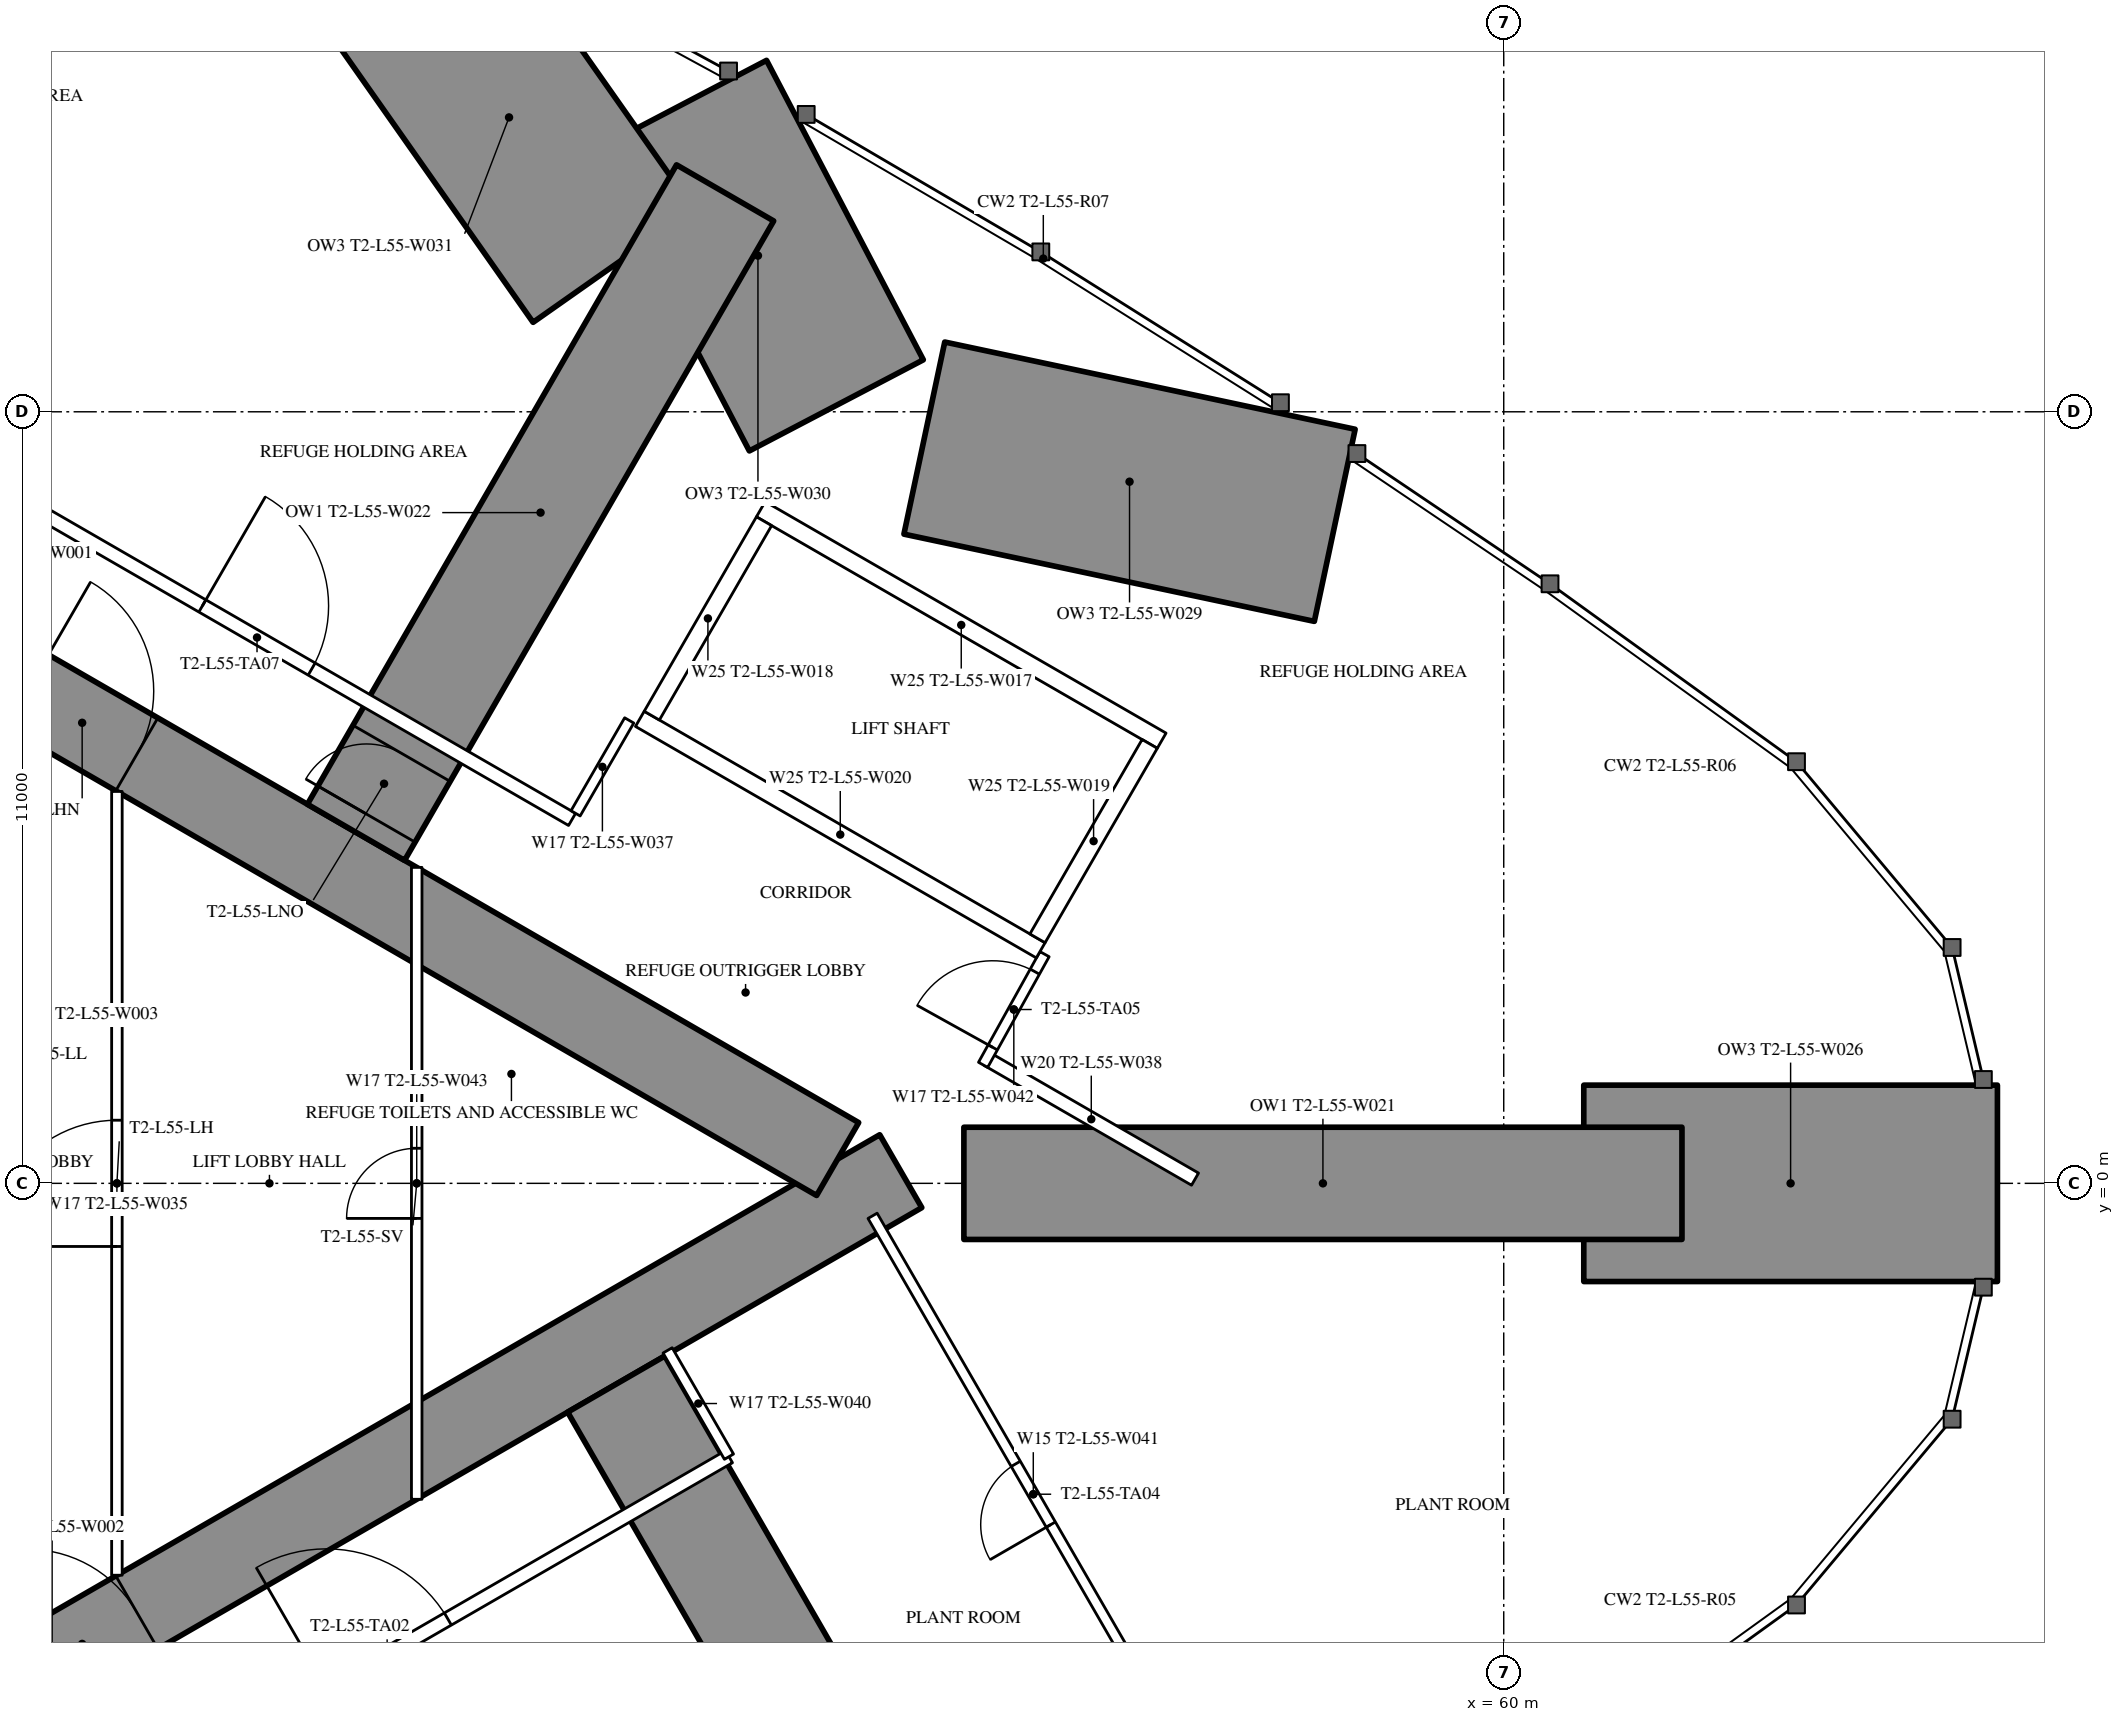
"""IFC4 building model, lengths in metres.
Left out: names, types, materials, properties, quantities, classifications, styles, units other than length and angle.
Written with IfcOpenShell. Run it as: python <this file> out.ifc"""

import sys

from ifc_helpers import new_model, si_unit, direction, frame, frame_2d, origin, place, context, subcontext, project, spatial, rectangle, extrude, element, fill, save


model = new_model("IFC4")
c1 = context("Model", 3, precision=1e-05, world=origin(), true_north=direction((0.0, 1.0)))
c2 = subcontext(c1, "Body", "Model", "MODEL_VIEW")
j1 = project(units=[si_unit("LENGTHUNIT", "METRE"), si_unit("PLANEANGLEUNIT", "RADIAN")], contexts=[c1])
p1 = place(None, origin())
s1 = spatial("IfcSite", under=j1, at=p1, CompositionType="ELEMENT")
p2 = place(p1, origin())
s2 = spatial("IfcBuilding", under=s1, at=p2, CompositionType="ELEMENT")
p3 = place(p2, frame((0.0, 0.0, 205.3)))
s3 = spatial("IfcBuildingStorey", under=s2, at=p3, CompositionType="ELEMENT", Elevation=205.3)
p4 = place(p3, frame((67.04, 0.0, 0.0), z_axis=(0.0, 0.0, 1.0), x_axis=(-1.0, 0.0, 0.0)))
e1 = element("IfcWall", 1, at=p4, inside=s3, PredefinedType="SHEAR", context=c2, shape_type="SweptSolid", body=[
    extrude(rectangle(XDim=5.898, YDim=2.8, at=frame_2d((2.949, 0.0))), origin(), (0.0, 0.0, 1.0), 5.0),
])
p5 = place(p3, frame((57.59, 9.381, 0.0), z_axis=(0.0, 0.0, 1.0), x_axis=(-0.978147441256, 0.207912441101, 0.0)))
e2 = element("IfcWall", 2, at=p5, inside=s3, PredefinedType="SHEAR", context=c2, shape_type="SweptSolid", body=[
    extrude(rectangle(XDim=5.983, YDim=2.8, at=frame_2d((2.991, 0.0))), origin(), (0.0, 0.0, 1.0), 5.0),
])
p6 = place(p3, frame((48.248, 15.361, 0.0), z_axis=(0.0, 0.0, 1.0), x_axis=(0.463812018538, -0.885933638293, 0.0)))
e3 = element("IfcWall", 3, at=p6, inside=s3, PredefinedType="SHEAR", context=c2, shape_type="SweptSolid", body=[
    extrude(rectangle(XDim=4.82, YDim=2.8, at=frame_2d((2.41, 0.0))), origin(), (0.0, 0.0, 1.0), 5.0),
])
p7 = place(p3, frame((44.328, 17.314, 0.0), z_axis=(0.0, 0.0, 1.0), x_axis=(0.575107689221, -0.818077713789, 0.0)))
e4 = element("IfcWall", 4, at=p7, inside=s3, PredefinedType="SHEAR", context=c2, shape_type="SweptSolid", body=[
    extrude(rectangle(XDim=5.175, YDim=2.8, at=frame_2d((2.587, 0.0))), origin(), (0.0, 0.0, 1.0), 5.0),
])
p8 = place(p3, frame((27.2, -13.8, 0.0), z_axis=(0.0, 0.0, 1.0), x_axis=(0.866027159892, 0.499996958321, 0.0)))
e5 = element("IfcWall", 5, at=p8, inside=s3, PredefinedType="SHEAR", context=c2, shape_type="SweptSolid", body=[
    extrude(rectangle(XDim=27.947, YDim=1.2, at=frame_2d((13.973, 0.0))), origin(), (0.0, 0.0, 1.0), 5.0),
])
p9 = place(p8, frame((6.5, 0.0, 0.0)))
e6 = element("IfcOpeningElement", 6, at=p9, cuts=e5, PredefinedType="OPENING", context=c2, shape_type="SweptSolid", body=[
    extrude(rectangle(XDim=1.0, YDim=2.2, at=frame_2d((0.5, 1.1))), frame((0.0, 0.61, 0.0), z_axis=(0.0, -1.0, 0.0), x_axis=(1.0, 0.0, 0.0)), (0.0, 0.0, 1.0), 1.22),
])
p10 = place(p8, frame((13.568, 0.0, 0.0)))
e7 = element("IfcOpeningElement", 7, at=p10, cuts=e5, PredefinedType="OPENING", context=c2, shape_type="SweptSolid", body=[
    extrude(rectangle(XDim=1.8, YDim=2.2, at=frame_2d((0.9, 1.1))), frame((0.0, 0.61, 0.0), z_axis=(0.0, -1.0, 0.0), x_axis=(1.0, 0.0, 0.0)), (0.0, 0.0, 1.0), 1.22),
])
p11 = place(p3, frame((27.2, 13.8, 0.0), z_axis=(0.0, 0.0, 1.0), x_axis=(0.866024515034, -0.500001539357, 0.0)))
e8 = element("IfcWall", 8, at=p11, inside=s3, PredefinedType="SHEAR", context=c2, shape_type="SweptSolid", body=[
    extrude(rectangle(XDim=26.907, YDim=1.2, at=frame_2d((13.454, 0.0))), origin(), (0.0, 0.0, 1.0), 5.0),
])
p12 = place(p11, frame((6.5, 0.0, 0.0)))
e9 = element("IfcOpeningElement", 9, at=p12, cuts=e8, PredefinedType="OPENING", context=c2, shape_type="SweptSolid", body=[
    extrude(rectangle(XDim=1.0, YDim=2.2, at=frame_2d((0.5, 1.1))), frame((0.0, 0.61, 0.0), z_axis=(0.0, -1.0, 0.0), x_axis=(1.0, 0.0, 0.0)), (0.0, 0.0, 1.0), 1.22),
])
p13 = place(p11, frame((13.568, 0.0, 0.0)))
e10 = element("IfcOpeningElement", 10, at=p13, cuts=e8, PredefinedType="OPENING", context=c2, shape_type="SweptSolid", body=[
    extrude(rectangle(XDim=1.8, YDim=2.2, at=frame_2d((0.9, 1.1))), frame((0.0, 0.61, 0.0), z_axis=(0.0, -1.0, 0.0), x_axis=(1.0, 0.0, 0.0)), (0.0, 0.0, 1.0), 1.22),
])
p14 = place(p3, frame((47.345, -2.862, 0.0), z_axis=(0.0, 0.0, 1.0), x_axis=(0.500012973899, -0.866017913171, 0.0)))
e11 = element("IfcWall", 11, at=p14, inside=s3, PredefinedType="SHEAR", context=c2, shape_type="SweptSolid", body=[
    extrude(rectangle(XDim=10.499, YDim=1.6, at=frame_2d((5.25, 0.0))), origin(), (0.0, 0.0, 1.0), 5.0),
])
p15 = place(p14, frame((5.087, 0.0, 0.0)))
e12 = element("IfcOpeningElement", 12, at=p15, cuts=e11, PredefinedType="OPENING", context=c2, shape_type="SweptSolid", body=[
    extrude(rectangle(XDim=1.0, YDim=2.2, at=frame_2d((0.5, 1.1))), frame((0.0, 0.81, 0.0), z_axis=(0.0, -1.0, 0.0), x_axis=(1.0, 0.0, 0.0)), (0.0, 0.0, 1.0), 1.62),
])
p16 = place(p3, frame((52.302, 0.0, 0.0), z_axis=(0.0, 0.0, 1.0), x_axis=(1.0, 0.0, 0.0)))
e13 = element("IfcWall", 13, at=p16, inside=s3, PredefinedType="SHEAR", context=c2, shape_type="SweptSolid", body=[
    extrude(rectangle(XDim=10.239, YDim=1.6, at=frame_2d((5.12, 0.0))), origin(), (0.0, 0.0, 1.0), 5.0),
])
p17 = place(p3, frame((43.634, 5.004, 0.0), z_axis=(0.0, 0.0, 1.0), x_axis=(0.499995493849, 0.866028005396, 0.0)))
e14 = element("IfcWall", 14, at=p17, inside=s3, PredefinedType="SHEAR", context=c2, shape_type="SweptSolid", body=[
    extrude(rectangle(XDim=10.526, YDim=1.6, at=frame_2d((5.263, 0.0))), origin(), (0.0, 0.0, 1.0), 5.0),
])
p18 = place(p17, frame((0.3, 0.0, 0.0)))
e15 = element("IfcOpeningElement", 15, at=p18, cuts=e14, PredefinedType="OPENING", context=c2, shape_type="SweptSolid", body=[
    extrude(rectangle(XDim=1.0, YDim=2.2, at=frame_2d((0.5, 1.1))), frame((0.0, 0.81, 0.0), z_axis=(0.0, -1.0, 0.0), x_axis=(1.0, 0.0, 0.0)), (0.0, 0.0, 1.0), 1.62),
])
p19 = place(p3, frame((55.583, -8.401, 0.0), z_axis=(0.0, 0.0, 1.0), x_axis=(-0.499997575924, 0.866026803321, 0.0)))
e16 = element("IfcWall", 16, at=p19, inside=s3, PredefinedType="PARTITIONING", context=c2, shape_type="SweptSolid", body=[
    extrude(rectangle(XDim=9.167, YDim=0.15, at=frame_2d((4.583, 0.0))), origin(), (0.0, 0.0, 1.0), 4.75),
])
p20 = place(p19, frame((4.083, 0.0, 0.0)))
e17 = element("IfcOpeningElement", 17, at=p20, cuts=e16, PredefinedType="OPENING", context=c2, shape_type="SweptSolid", body=[
    extrude(rectangle(XDim=1.0, YDim=2.2, at=frame_2d((0.5, 1.1))), frame((0.0, 0.085, 0.0), z_axis=(0.0, -1.0, 0.0), x_axis=(1.0, 0.0, 0.0)), (0.0, 0.0, 1.0), 0.17),
])
p21 = place(p3, frame((27.959, 16.017, 0.0), z_axis=(0.0, 0.0, 1.0), x_axis=(0.866027146794, -0.499996981007, 0.0)))
e18 = element("IfcWall", 18, at=p21, inside=s3, PredefinedType="PARTITIONING", context=c2, shape_type="SweptSolid", body=[
    extrude(rectangle(XDim=21.657, YDim=0.2, at=frame_2d((10.829, 0.0))), origin(), (0.0, 0.0, 1.0), 4.75),
])
p22 = place(p21, frame((15.57, 0.0, 0.0)))
e19 = element("IfcOpeningElement", 19, at=p22, cuts=e18, PredefinedType="OPENING", context=c2, shape_type="SweptSolid", body=[
    extrude(rectangle(XDim=1.8, YDim=2.2, at=frame_2d((0.9, 1.1))), frame((0.0, 0.11, 0.0), z_axis=(0.0, -1.0, 0.0), x_axis=(1.0, 0.0, 0.0)), (0.0, 0.0, 1.0), 0.22),
])
p23 = place(p21, frame((6.579, 0.0, 0.0)))
e20 = element("IfcOpeningElement", 20, at=p23, cuts=e18, PredefinedType="OPENING", context=c2, shape_type="SweptSolid", body=[
    extrude(rectangle(XDim=1.8, YDim=2.2, at=frame_2d((0.9, 1.1))), frame((0.0, 0.11, 0.0), z_axis=(0.0, -1.0, 0.0), x_axis=(1.0, 0.0, 0.0)), (0.0, 0.0, 1.0), 0.22),
])
p24 = place(p3, frame((52.639, 1.769, 0.0), z_axis=(0.0, 0.0, 1.0), x_axis=(0.866027340901, -0.4999966448, 0.0)))
e21 = element("IfcWall", 21, at=p24, inside=s3, PredefinedType="PARTITIONING", context=c2, shape_type="SweptSolid", body=[
    extrude(rectangle(XDim=3.417, YDim=0.2, at=frame_2d((1.708, 0.0))), origin(), (0.0, 0.0, 1.0), 4.75),
])
p25 = place(p3, frame((52.576, 1.689, 0.0), z_axis=(0.0, 0.0, 1.0), x_axis=(0.485482130951, 0.874246590229, 0.0)))
e22 = element("IfcWall", 22, at=p25, inside=s3, PredefinedType="PARTITIONING", context=c2, shape_type="SweptSolid", body=[
    extrude(rectangle(XDim=1.805, YDim=0.15, at=frame_2d((0.902, 0.0))), origin(), (0.0, 0.0, 1.0), 4.75),
])
p26 = place(p25, frame((0.285, 0.0, 0.0)))
e23 = element("IfcOpeningElement", 23, at=p26, cuts=e22, PredefinedType="OPENING", context=c2, shape_type="SweptSolid", body=[
    extrude(rectangle(XDim=1.235, YDim=2.2, at=frame_2d((0.618, 1.1))), frame((0.0, 0.085, 0.0), z_axis=(0.0, -1.0, 0.0), x_axis=(1.0, 0.0, 0.0)), (0.0, 0.0, 1.0), 0.17),
])
p27 = place(p3, frame((46.765, 5.275, 0.0), z_axis=(0.0, 0.0, 1.0), x_axis=(0.499915892944, 0.866073957571, 0.0)))
e24 = element("IfcWall", 24, at=p27, inside=s3, PredefinedType="PARTITIONING", context=c2, shape_type="SweptSolid", body=[
    extrude(rectangle(XDim=1.53, YDim=0.15, at=frame_2d((0.765, 0.0))), origin(), (0.0, 0.0, 1.0), 4.75),
])
p28 = place(p3, frame((27.959, -16.017, 0.0), z_axis=(0.0, 0.0, 1.0), x_axis=(0.866026253963, 0.499998527445, 0.0)))
e25 = element("IfcWall", 25, at=p28, inside=s3, PredefinedType="PARTITIONING", context=c2, shape_type="SweptSolid", body=[
    extrude(rectangle(XDim=24.241, YDim=0.2, at=frame_2d((12.12, 0.0))), origin(), (0.0, 0.0, 1.0), 4.75),
])
p29 = place(p28, frame((6.579, 0.0, 0.0)))
e26 = element("IfcOpeningElement", 26, at=p29, cuts=e25, PredefinedType="OPENING", context=c2, shape_type="SweptSolid", body=[
    extrude(rectangle(XDim=1.8, YDim=2.2, at=frame_2d((0.9, 1.1))), frame((0.0, 0.11, 0.0), z_axis=(0.0, -1.0, 0.0), x_axis=(1.0, 0.0, 0.0)), (0.0, 0.0, 1.0), 0.22),
])
p30 = place(p28, frame((17.612, 0.0, 0.0)))
e27 = element("IfcOpeningElement", 27, at=p30, cuts=e25, PredefinedType="OPENING", context=c2, shape_type="SweptSolid", body=[
    extrude(rectangle(XDim=2.0, YDim=2.4, at=frame_2d((1.0, 1.2))), frame((0.0, 0.11, 0.0), z_axis=(0.0, -1.0, 0.0), x_axis=(1.0, 0.0, 0.0)), (0.0, 0.0, 1.0), 0.22),
])
p31 = place(p3, frame((48.953, -3.897, 0.0), z_axis=(0.0, 0.0, 1.0), x_axis=(-0.499980071345, 0.866036909293, 0.0)))
e28 = element("IfcWall", 28, at=p31, inside=s3, PredefinedType="PARTITIONING", context=c2, shape_type="SweptSolid", body=[
    extrude(rectangle(XDim=1.75, YDim=0.15, at=frame_2d((0.875, 0.0))), origin(), (0.0, 0.0, 1.0), 4.75),
])
p32 = place(p3, frame((40.225, -5.587, 0.0), z_axis=(0.0, 0.0, 1.0), x_axis=(0.0, 1.0, 0.0)))
e29 = element("IfcWall", 29, at=p32, inside=s3, PredefinedType="PARTITIONING", context=c2, shape_type="SweptSolid", body=[
    extrude(rectangle(XDim=11.174, YDim=0.15, at=frame_2d((5.587, 0.0))), origin(), (0.0, 0.0, 1.0), 4.75),
])
p33 = place(p32, frame((4.687, 0.0, 0.0)))
e30 = element("IfcOpeningElement", 30, at=p33, cuts=e29, PredefinedType="OPENING", context=c2, shape_type="SweptSolid", body=[
    extrude(rectangle(XDim=1.8, YDim=2.2, at=frame_2d((0.9, 1.1))), frame((0.0, 0.085, 0.0), z_axis=(0.0, -1.0, 0.0), x_axis=(1.0, 0.0, 0.0)), (0.0, 0.0, 1.0), 0.17),
])
p34 = place(p3, frame((44.5, -4.505, 0.0), z_axis=(0.0, 0.0, 1.0), x_axis=(0.0, 1.0, 0.0)))
e31 = element("IfcWall", 31, at=p34, inside=s3, PredefinedType="PARTITIONING", context=c2, shape_type="SweptSolid", body=[
    extrude(rectangle(XDim=9.009, YDim=0.15, at=frame_2d((4.505, 0.0))), origin(), (0.0, 0.0, 1.0), 4.75),
])
p35 = place(p34, frame((4.005, 0.0, 0.0)))
e32 = element("IfcOpeningElement", 32, at=p35, cuts=e31, PredefinedType="OPENING", context=c2, shape_type="SweptSolid", body=[
    extrude(rectangle(XDim=1.0, YDim=2.2, at=frame_2d((0.5, 1.1))), frame((0.0, 0.085, 0.0), z_axis=(0.0, -1.0, 0.0), x_axis=(1.0, 0.0, 0.0)), (0.0, 0.0, 1.0), 0.17),
])
for number, where, z_axis, x_axis in (
    (33, (47.681, 6.622, 0.0), (0.0, 0.0, 1.0), (0.866, -0.5, 0.0)),
    (34, (49.406, 9.611, 0.0), (0.0, 0.0, 1.0), (0.866, -0.5, 0.0)),
):
    element("IfcWall", number, at=place(p3, frame(where, z_axis=z_axis, x_axis=x_axis)), inside=s3, PredefinedType="PARTITIONING", context=c2, shape_type="SweptSolid", body=[
        extrude(rectangle(XDim=6.6, YDim=0.25, at=frame_2d((3.3, 0.0))), origin(), (0.0, 0.0, 1.0), 4.75),
    ])
p36 = place(p3, frame((47.852, 6.668, 0.0), z_axis=(0.0, 0.0, 1.0), x_axis=(0.499929347863, 0.866066190972, 0.0)))
e35 = element("IfcWall", 35, at=p36, inside=s3, PredefinedType="PARTITIONING", context=c2, shape_type="SweptSolid", body=[
    extrude(rectangle(XDim=3.201, YDim=0.25, at=frame_2d((1.6, 0.0))), origin(), (0.0, 0.0, 1.0), 4.75),
])
p37 = place(p3, frame((53.352, 3.493, 0.0), z_axis=(0.0, 0.0, 1.0), x_axis=(0.499872130319, 0.866099216793, 0.0)))
e36 = element("IfcWall", 36, at=p37, inside=s3, PredefinedType="PARTITIONING", context=c2, shape_type="SweptSolid", body=[
    extrude(rectangle(XDim=3.2, YDim=0.25, at=frame_2d((1.6, 0.0))), origin(), (0.0, 0.0, 1.0), 4.75),
])
p38 = place(p18, origin())
e37 = element("IfcDoor", 37, at=p38, inside=s3, OperationType="SINGLE_SWING_LEFT", PredefinedType="DOOR", context=c2, shape_type="SweptSolid", body=[
    extrude(rectangle(XDim=1.0, YDim=2.2, at=frame_2d((0.5, 1.1))), frame((0.0, 0.025, 0.0), z_axis=(0.0, -1.0, 0.0), x_axis=(1.0, 0.0, 0.0)), (0.0, 0.0, 1.0), 0.05),
])
fill(e15, e37)
p39 = place(p30, origin())
e38 = element("IfcDoor", 38, at=p39, inside=s3, OperationType="DOUBLE_DOOR_SINGLE_SWING", PredefinedType="DOOR", context=c2, shape_type="SweptSolid", body=[
    extrude(rectangle(XDim=2.0, YDim=2.4, at=frame_2d((1.0, 1.2))), frame((0.0, 0.025, 0.0), z_axis=(0.0, -1.0, 0.0), x_axis=(1.0, 0.0, 0.0)), (0.0, 0.0, 1.0), 0.05),
])
fill(e27, e38)
p40 = place(p22, origin())
e39 = element("IfcDoor", 39, at=p40, inside=s3, OperationType="DOUBLE_DOOR_SINGLE_SWING", PredefinedType="DOOR", context=c2, shape_type="SweptSolid", body=[
    extrude(rectangle(XDim=1.8, YDim=2.2, at=frame_2d((0.9, 1.1))), frame((0.0, 0.025, 0.0), z_axis=(0.0, -1.0, 0.0), x_axis=(1.0, 0.0, 0.0)), (0.0, 0.0, 1.0), 0.05),
])
fill(e19, e39)
p41 = place(p26, origin())
e40 = element("IfcDoor", 40, at=p41, inside=s3, OperationType="SINGLE_SWING_LEFT", PredefinedType="DOOR", context=c2, shape_type="SweptSolid", body=[
    extrude(rectangle(XDim=1.235, YDim=2.2, at=frame_2d((0.618, 1.1))), frame((0.0, 0.025, 0.0), z_axis=(0.0, -1.0, 0.0), x_axis=(1.0, 0.0, 0.0)), (0.0, 0.0, 1.0), 0.05),
])
fill(e23, e40)
p42 = place(p20, origin())
e41 = element("IfcDoor", 41, at=p42, inside=s3, OperationType="SINGLE_SWING_LEFT", PredefinedType="DOOR", context=c2, shape_type="SweptSolid", body=[
    extrude(rectangle(XDim=1.0, YDim=2.2, at=frame_2d((0.5, 1.1))), frame((0.0, 0.025, 0.0), z_axis=(0.0, -1.0, 0.0), x_axis=(1.0, 0.0, 0.0)), (0.0, 0.0, 1.0), 0.05),
])
fill(e17, e41)
p43 = place(p33, origin())
e42 = element("IfcDoor", 42, at=p43, inside=s3, OperationType="DOUBLE_DOOR_SINGLE_SWING", PredefinedType="DOOR", context=c2, shape_type="SweptSolid", body=[
    extrude(rectangle(XDim=1.8, YDim=2.2, at=frame_2d((0.9, 1.1))), frame((0.0, 0.025, 0.0), z_axis=(0.0, -1.0, 0.0), x_axis=(1.0, 0.0, 0.0)), (0.0, 0.0, 1.0), 0.05),
])
fill(e30, e42)
p44 = place(p35, origin())
e43 = element("IfcDoor", 43, at=p44, inside=s3, OperationType="SINGLE_SWING_LEFT", PredefinedType="DOOR", context=c2, shape_type="SweptSolid", body=[
    extrude(rectangle(XDim=1.0, YDim=2.2, at=frame_2d((0.5, 1.1))), frame((0.0, 0.025, 0.0), z_axis=(0.0, -1.0, 0.0), x_axis=(1.0, 0.0, 0.0)), (0.0, 0.0, 1.0), 0.05),
])
fill(e32, e43)
p45 = place(p10, origin())
e44 = element("IfcDoor", 44, at=p45, inside=s3, OperationType="DOUBLE_DOOR_SINGLE_SWING", PredefinedType="DOOR", context=c2, shape_type="SweptSolid", body=[
    extrude(rectangle(XDim=1.8, YDim=2.2, at=frame_2d((0.9, 1.1))), frame((0.0, 0.025, 0.0), z_axis=(0.0, -1.0, 0.0), x_axis=(1.0, 0.0, 0.0)), (0.0, 0.0, 1.0), 0.05),
])
fill(e7, e44)
p46 = place(p13, origin())
e45 = element("IfcDoor", 45, at=p46, inside=s3, OperationType="DOUBLE_DOOR_SINGLE_SWING", PredefinedType="DOOR", context=c2, shape_type="SweptSolid", body=[
    extrude(rectangle(XDim=1.8, YDim=2.2, at=frame_2d((0.9, 1.1))), frame((0.0, 0.025, 0.0), z_axis=(0.0, -1.0, 0.0), x_axis=(1.0, 0.0, 0.0)), (0.0, 0.0, 1.0), 0.05),
])
fill(e10, e45)
save(model, sys.argv[1])
